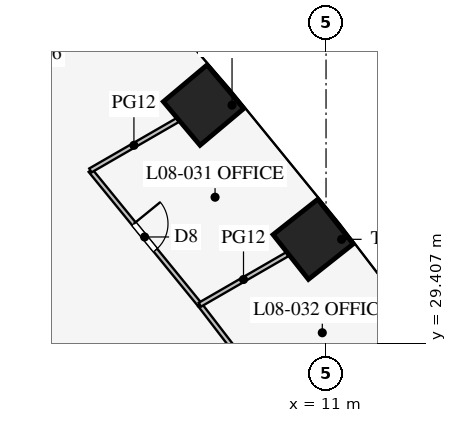
"""IFC4 building model, lengths in metres.
Left out: names, types, materials, properties, quantities, classifications, styles, units other than length and angle.
Written with IfcOpenShell. Run it as: python <this file> out.ifc"""

import sys

from ifc_helpers import new_model, si_unit, direction, frame, frame_2d, origin, origin_2d, place, context, subcontext, project, spatial, rectangle, extrude, element, fill, save


model = new_model("IFC4")
c1 = context("Model", 3, precision=1e-05, world=origin(), true_north=direction((0.0, 1.0)))
c2 = subcontext(c1, "Body", "Model", "MODEL_VIEW")
j1 = project(units=[si_unit("LENGTHUNIT", "METRE"), si_unit("PLANEANGLEUNIT", "RADIAN")], contexts=[c1])
p1 = place(None, origin())
s1 = spatial("IfcSite", under=j1, at=p1, CompositionType="ELEMENT")
p2 = place(p1, origin())
s2 = spatial("IfcBuilding", under=s1, at=p2, CompositionType="ELEMENT")
p3 = place(p2, frame((0.0, 0.0, 37.5)))
s3 = spatial("IfcBuildingStorey", under=s2, at=p3, CompositionType="ELEMENT", Elevation=37.5)
for number, where, z_axis, x_axis in (
    (1, (10.66, 32.135, 0.0), (0.0, 0.0, 1.0), (-0.62, 0.784, 0.0)),
    (2, (7.776, 35.667, 0.0), (0.0, 0.0, 1.0), (-0.643, 0.766, 0.0)),
):
    element("IfcColumn", number, at=place(p3, frame(where, z_axis=z_axis, x_axis=x_axis)), inside=s3, PredefinedType="COLUMN", context=c2, shape_type="SweptSolid", body=[
        extrude(rectangle(XDim=1.5, YDim=1.5, at=origin_2d()), origin(), (0.0, 0.0, 1.0), 4.2),
    ])
p4 = place(p3, frame((10.443, 26.814, 0.0), z_axis=(0.0, 0.0, 1.0), x_axis=(-0.608818785139, 0.79330932609, 0.0)))
e3 = element("IfcWall", 3, at=p4, inside=s3, PredefinedType="PARTITIONING", context=c2, shape_type="SweptSolid", body=[
    extrude(rectangle(XDim=4.539, YDim=0.12, at=frame_2d((2.27, 0.0))), origin(), (0.0, 0.0, 1.0), 2.9),
])
p5 = place(p4, frame((1.8, 0.0, 0.15)))
e4 = element("IfcOpeningElement", 4, at=p5, cuts=e3, PredefinedType="OPENING", context=c2, shape_type="SweptSolid", body=[
    extrude(rectangle(XDim=0.9, YDim=2.1, at=frame_2d((0.45, 1.05))), frame((0.0, 0.07, 0.0), z_axis=(0.0, -1.0, 0.0), x_axis=(1.0, 0.0, 0.0)), (0.0, 0.0, 1.0), 0.14),
])
p6 = place(p3, frame((7.679, 30.415, 0.0), z_axis=(0.0, 0.0, 1.0), x_axis=(-0.631833879056, 0.775103831288, 0.0)))
e5 = element("IfcWall", 5, at=p6, inside=s3, PredefinedType="PARTITIONING", context=c2, shape_type="SweptSolid", body=[
    extrude(rectangle(XDim=4.558, YDim=0.12, at=frame_2d((2.279, 0.0))), origin(), (0.0, 0.0, 1.0), 2.9),
])
p7 = place(p6, frame((1.85, 0.0, 0.15)))
e6 = element("IfcOpeningElement", 6, at=p7, cuts=e5, PredefinedType="OPENING", context=c2, shape_type="SweptSolid", body=[
    extrude(rectangle(XDim=0.9, YDim=2.1, at=frame_2d((0.45, 1.05))), frame((0.0, 0.07, 0.0), z_axis=(0.0, -1.0, 0.0), x_axis=(1.0, 0.0, 0.0)), (0.0, 0.0, 1.0), 0.14),
])
p8 = place(p3, frame((7.679, 30.415, 0.0), z_axis=(0.0, 0.0, 1.0), x_axis=(0.866026229868, 0.499998569178, 0.0)))
e7 = element("IfcWall", 7, at=p8, inside=s3, PredefinedType="PARTITIONING", context=c2, shape_type="SweptSolid", body=[
    extrude(rectangle(XDim=2.653, YDim=0.12, at=frame_2d((1.327, 0.0))), origin(), (0.0, 0.0, 1.0), 2.9),
])
p9 = place(p3, frame((4.799, 33.948, 0.0), z_axis=(0.0, 0.0, 1.0), x_axis=(0.866002718738, 0.500039289594, 0.0)))
e8 = element("IfcWall", 8, at=p9, inside=s3, PredefinedType="PARTITIONING", context=c2, shape_type="SweptSolid", body=[
    extrude(rectangle(XDim=2.646, YDim=0.12, at=frame_2d((1.323, 0.0))), origin(), (0.0, 0.0, 1.0), 2.9),
])
p10 = place(p7, frame((0.9, 0.0, 0.0), z_axis=(0.0, 0.0, 1.0), x_axis=(-1.0, 0.0, 0.0)))
e9 = element("IfcDoor", 9, at=p10, inside=s3, OperationType="SINGLE_SWING_LEFT", PredefinedType="DOOR", context=c2, shape_type="SweptSolid", body=[
    extrude(rectangle(XDim=0.9, YDim=2.1, at=frame_2d((0.45, 1.05))), frame((0.0, 0.025, 0.0), z_axis=(0.0, -1.0, 0.0), x_axis=(1.0, 0.0, 0.0)), (0.0, 0.0, 1.0), 0.05),
])
fill(e6, e9)
save(model, sys.argv[1])
